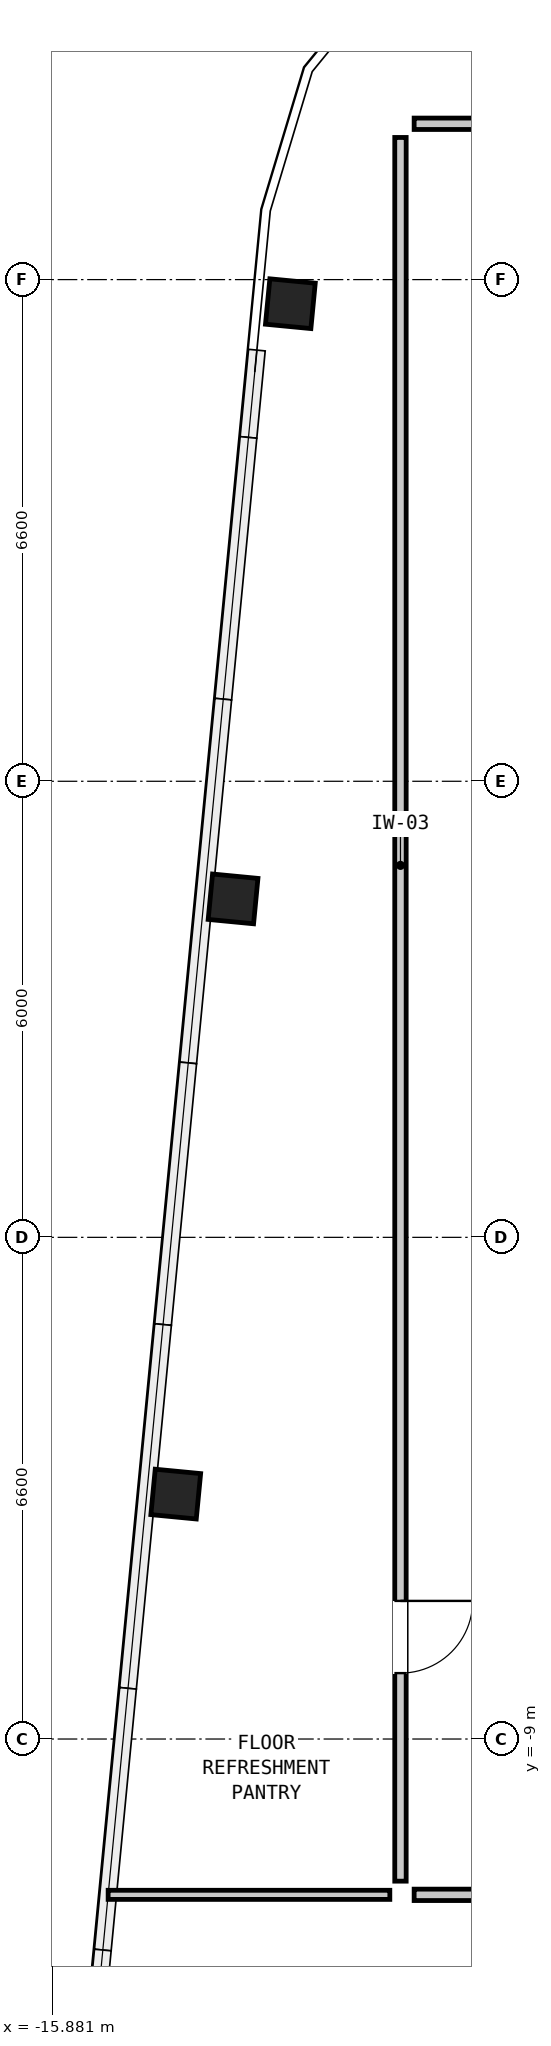
"""IFC4 building model, lengths in metres.
Left out: names, types, materials, properties, quantities, classifications, styles, units other than length and angle.
Written with IfcOpenShell. Run it as: python <this file> out.ifc"""

import sys

from ifc_helpers import new_model, si_unit, direction, frame, frame_2d, origin, origin_2d, place, context, subcontext, project, spatial, rectangle, hollow_rectangle, extrude, element, fill, save


model = new_model("IFC4")
c1 = context("Model", 3, precision=1e-05, world=origin(), true_north=direction((0.0, 1.0)))
c2 = subcontext(c1, "Body", "Model", "MODEL_VIEW")
j1 = project(units=[si_unit("LENGTHUNIT", "METRE"), si_unit("PLANEANGLEUNIT", "RADIAN")], contexts=[c1])
p1 = place(None, origin())
s1 = spatial("IfcSite", under=j1, at=p1, CompositionType="ELEMENT")
p2 = place(p1, origin())
s2 = spatial("IfcBuilding", under=s1, at=p2, CompositionType="ELEMENT")
p3 = place(p2, frame((0.0, 0.0, 245.9)))
s3 = spatial("IfcBuildingStorey", under=s2, at=p3, CompositionType="ELEMENT", Elevation=245.9)
for number, where, z_axis, x_axis in (
    (1, (-12.749, 9.883, 0.0), (0.0, 0.0, 1.0), (0.096, 0.995, 0.0)),
    (2, (-13.502, 2.052, 0.0), (0.0, 0.0, 1.0), (0.096, 0.995, 0.0)),
    (3, (-14.256, -5.778, 0.0), (0.0, 0.0, 1.0), (0.096, 0.995, 0.0)),
):
    element("IfcColumn", number, at=place(p3, frame(where, z_axis=z_axis, x_axis=x_axis)), inside=s3, PredefinedType="COLUMN", context=c2, shape_type="SweptSolid", body=[
        extrude(hollow_rectangle(XDim=0.6, YDim=0.6, WallThickness=0.04, at=origin_2d()), origin(), (0.0, 0.0, 1.0), 3.05),
    ])
p4 = place(p3, frame((-15.146, -11.05, 0.0), z_axis=(0.0, 0.0, 1.0), x_axis=(1.0, 0.0, 0.0)))
e4 = element("IfcWall", 4, at=p4, inside=s3, PredefinedType="PARTITIONING", context=c2, shape_type="SweptSolid", body=[
    extrude(rectangle(XDim=3.706, YDim=0.12, at=frame_2d((1.853, 0.0))), origin(), (0.0, 0.0, 1.0), 2.86),
])
p5 = place(p3, frame((-11.12, 12.25, 0.0), z_axis=(0.0, 0.0, 1.0), x_axis=(1.0, 0.0, 0.0)))
e5 = element("IfcWall", 5, at=p5, inside=s3, PredefinedType="PARTITIONING", context=c2, shape_type="SweptSolid", body=[
    extrude(rectangle(XDim=10.44, YDim=0.15, at=frame_2d((5.22, 0.0))), origin(), (0.0, 0.0, 1.0), 2.86),
])
p6 = place(p5, frame((4.745, 0.0, 0.0)))
e6 = element("IfcOpeningElement", 6, at=p6, cuts=e5, PredefinedType="OPENING", context=c2, shape_type="SweptSolid", body=[
    extrude(rectangle(XDim=0.95, YDim=2.1, at=frame_2d((0.475, 1.05))), frame((0.0, 0.087, 0.0), z_axis=(0.0, -1.0, 0.0), x_axis=(1.0, 0.0, 0.0)), (0.0, 0.0, 1.0), 0.174),
])
p7 = place(p3, frame((-11.12, -11.05, 0.0), z_axis=(0.0, 0.0, 1.0), x_axis=(1.0, 0.0, 0.0)))
e7 = element("IfcWall", 7, at=p7, inside=s3, PredefinedType="PARTITIONING", context=c2, shape_type="SweptSolid", body=[
    extrude(rectangle(XDim=22.59, YDim=0.15, at=frame_2d((11.295, 0.0))), origin(), (0.0, 0.0, 1.0), 2.86),
])
p8 = place(p7, frame((10.82, 0.0, 0.0)))
e8 = element("IfcOpeningElement", 8, at=p8, cuts=e7, PredefinedType="OPENING", context=c2, shape_type="SweptSolid", body=[
    extrude(rectangle(XDim=0.95, YDim=2.1, at=frame_2d((0.475, 1.05))), frame((0.0, 0.087, 0.0), z_axis=(0.0, -1.0, 0.0), x_axis=(1.0, 0.0, 0.0)), (0.0, 0.0, 1.0), 0.174),
])
p9 = place(p3, frame((-11.3, 12.07, 0.0), z_axis=(0.0, 0.0, 1.0), x_axis=(0.0, -1.0, 0.0)))
e9 = element("IfcWall", 9, at=p9, inside=s3, PredefinedType="PARTITIONING", context=c2, shape_type="SweptSolid", body=[
    extrude(rectangle(XDim=22.94, YDim=0.15, at=frame_2d((11.47, 0.0))), origin(), (0.0, 0.0, 1.0), 2.86),
])
p10 = place(p9, frame((19.253, 0.0, 0.0)))
e10 = element("IfcOpeningElement", 10, at=p10, cuts=e9, PredefinedType="OPENING", context=c2, shape_type="SweptSolid", body=[
    extrude(rectangle(XDim=0.95, YDim=2.1, at=frame_2d((0.475, 1.05))), frame((0.0, 0.087, 0.0), z_axis=(0.0, -1.0, 0.0), x_axis=(1.0, 0.0, 0.0)), (0.0, 0.0, 1.0), 0.174),
])
p11 = place(p10, origin())
e11 = element("IfcDoor", 11, at=p11, inside=s3, OperationType="SINGLE_SWING_LEFT", PredefinedType="DOOR", context=c2, shape_type="SweptSolid", body=[
    extrude(rectangle(XDim=0.95, YDim=2.1, at=frame_2d((0.475, 1.05))), frame((0.0, 0.025, 0.0), z_axis=(0.0, -1.0, 0.0), x_axis=(1.0, 0.0, 0.0)), (0.0, 0.0, 1.0), 0.05),
])
fill(e10, e11)
save(model, sys.argv[1])
